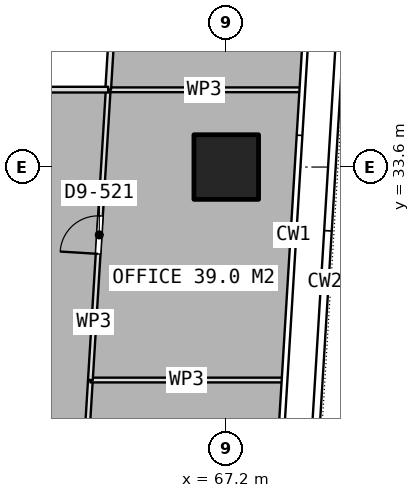
"""IFC4 building model, lengths in metres.
Left out: names, types, materials, properties, quantities, classifications, styles, units other than length and angle.
Written with IfcOpenShell. Run it as: python <this file> out.ifc"""

import sys

from ifc_helpers import new_model, si_unit, direction, frame, frame_2d, origin, origin_2d, place, context, subcontext, project, spatial, rectangle, extrude, element, fill, save


model = new_model("IFC4")
c1 = context("Model", 3, precision=1e-05, world=origin(), true_north=direction((0.0, 1.0)))
c2 = subcontext(c1, "Body", "Model", "MODEL_VIEW")
j1 = project(units=[si_unit("LENGTHUNIT", "METRE"), si_unit("PLANEANGLEUNIT", "RADIAN")], contexts=[c1])
p1 = place(None, origin())
s1 = spatial("IfcSite", under=j1, at=p1, CompositionType="ELEMENT")
p2 = place(p1, origin())
s2 = spatial("IfcBuilding", under=s1, at=p2, CompositionType="ELEMENT")
p3 = place(p2, frame((0.0, 0.0, 132.8)))
s3 = spatial("IfcBuildingStorey", under=s2, at=p3, CompositionType="ELEMENT", Elevation=132.8)
p4 = place(p3, frame((67.2, 33.6, 0.0), z_axis=(0.0, 0.0, 1.0), x_axis=(1.0, 0.0, 0.0)))
e1 = element("IfcColumn", 1, at=p4, inside=s3, PredefinedType="COLUMN", context=c2, shape_type="SweptSolid", body=[
    extrude(rectangle(XDim=1.7, YDim=1.7, at=origin_2d()), origin(), (0.0, 0.0, 1.0), 3.75),
])
p5 = place(p3, frame((63.193, 20.939, 0.0), z_axis=(0.0, 0.0, 1.0), x_axis=(0.061084086736, 0.998132623627, 0.0)))
e2 = element("IfcWall", 2, at=p5, inside=s3, PredefinedType="PARTITIONING", context=c2, shape_type="SweptSolid", body=[
    extrude(rectangle(XDim=7.07, YDim=0.125, at=frame_2d((3.535, 0.0))), origin(), (0.0, 0.0, 1.0), 3.5),
])
p6 = place(p5, frame((2.133, 0.0, 0.0)))
e3 = element("IfcOpeningElement", 3, at=p6, cuts=e2, PredefinedType="OPENING", context=c2, shape_type="SweptSolid", body=[
    extrude(rectangle(XDim=1.8, YDim=2.1, at=frame_2d((0.9, 1.05))), frame((0.0, 0.073, 0.0), z_axis=(0.0, -1.0, 0.0), x_axis=(1.0, 0.0, 0.0)), (0.0, 0.0, 1.0), 0.145),
])
p7 = place(p3, frame((63.625, 27.996, 0.0), z_axis=(0.0, 0.0, 1.0), x_axis=(1.0, 0.0, 0.0)))
e4 = element("IfcWall", 4, at=p7, inside=s3, PredefinedType="PARTITIONING", context=c2, shape_type="SweptSolid", body=[
    extrude(rectangle(XDim=5.059, YDim=0.125, at=frame_2d((2.53, 0.0))), origin(), (0.0, 0.0, 1.0), 3.5),
])
p8 = place(p3, frame((63.625, 27.997, 0.0), z_axis=(0.0, 0.0, 1.0), x_axis=(0.061176245149, 0.998126979412, 0.0)))
e5 = element("IfcWall", 5, at=p8, inside=s3, PredefinedType="PARTITIONING", context=c2, shape_type="SweptSolid", body=[
    extrude(rectangle(XDim=7.65, YDim=0.125, at=frame_2d((3.825, 0.0))), origin(), (0.0, 0.0, 1.0), 3.5),
])
p9 = place(p8, frame((3.325, 0.0, 0.0)))
e6 = element("IfcOpeningElement", 6, at=p9, cuts=e5, PredefinedType="OPENING", context=c2, shape_type="SweptSolid", body=[
    extrude(rectangle(XDim=1.0, YDim=2.1, at=frame_2d((0.5, 1.05))), frame((0.0, 0.073, 0.0), z_axis=(0.0, -1.0, 0.0), x_axis=(1.0, 0.0, 0.0)), (0.0, 0.0, 1.0), 0.145),
])
p10 = place(p3, frame((64.093, 35.633, 0.0), z_axis=(0.0, 0.0, 1.0), x_axis=(1.0, 0.0, 0.0)))
e7 = element("IfcWall", 7, at=p10, inside=s3, PredefinedType="PARTITIONING", context=c2, shape_type="SweptSolid", body=[
    extrude(rectangle(XDim=5.059, YDim=0.125, at=frame_2d((2.53, 0.0))), origin(), (0.0, 0.0, 1.0), 3.5),
])
p11 = place(p3, frame((64.093, 35.637, 0.0), z_axis=(0.0, 0.0, 1.0), x_axis=(0.060920139636, 0.998142643407, 0.0)))
e8 = element("IfcWall", 8, at=p11, inside=s3, PredefinedType="PARTITIONING", context=c2, shape_type="SweptSolid", body=[
    extrude(rectangle(XDim=1.803, YDim=0.15, at=frame_2d((0.902, 0.0))), origin(), (0.0, 0.0, 1.0), 3.5),
])
p12 = place(p3, frame((53.2, 35.637, 0.0), z_axis=(0.0, 0.0, 1.0), x_axis=(1.0, 0.0, 0.0)))
e9 = element("IfcWall", 9, at=p12, inside=s3, PredefinedType="PARTITIONING", context=c2, shape_type="SweptSolid", body=[
    extrude(rectangle(XDim=10.893, YDim=0.15, at=frame_2d((5.447, 0.0))), origin(), (0.0, 0.0, 1.0), 3.5),
])
p13 = place(p9, origin())
e10 = element("IfcDoor", 10, at=p13, inside=s3, OperationType="SINGLE_SWING_LEFT", PredefinedType="DOOR", context=c2, shape_type="SweptSolid", body=[
    extrude(rectangle(XDim=1.0, YDim=2.1, at=frame_2d((0.5, 1.05))), frame((0.0, 0.025, 0.0), z_axis=(0.0, -1.0, 0.0), x_axis=(1.0, 0.0, 0.0)), (0.0, 0.0, 1.0), 0.05),
])
fill(e6, e10)
save(model, sys.argv[1])
